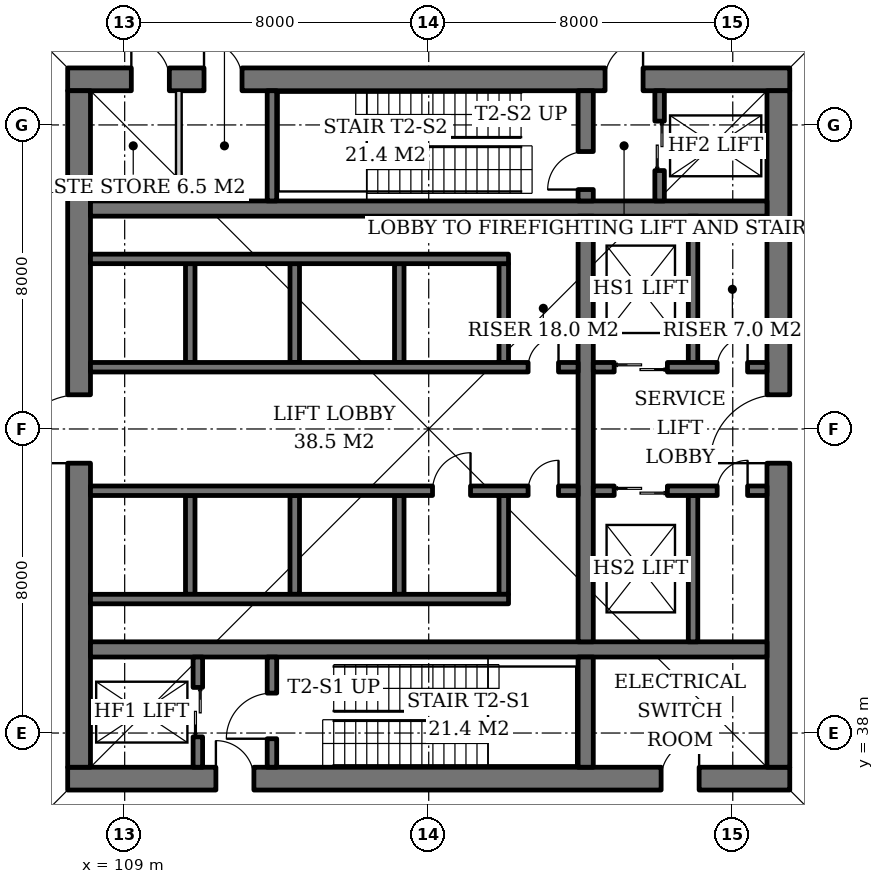
"""IFC4 building model, lengths in metres.
Left out: names, types, materials, properties, quantities, classifications, styles, units other than length and angle.
Written with IfcOpenShell. Run it as: python <this file> out.ifc"""

import sys

from ifc_helpers import new_model, si_unit, direction, frame, frame_2d, origin, place, context, subcontext, project, spatial, rectangle, extrude, element, fill, save


model = new_model("IFC4")
c1 = context("Model", 3, precision=1e-05, world=origin(), true_north=direction((0.0, 1.0)))
c2 = subcontext(c1, "Body", "Model", "MODEL_VIEW")
j1 = project(units=[si_unit("LENGTHUNIT", "METRE"), si_unit("PLANEANGLEUNIT", "RADIAN")], contexts=[c1])
p1 = place(None, origin())
s1 = spatial("IfcSite", under=j1, at=p1, CompositionType="ELEMENT")
p2 = place(p1, origin())
s2 = spatial("IfcBuilding", under=s1, at=p2, CompositionType="ELEMENT")
p3 = place(p2, frame((0.0, 0.0, -10.0)))
s3 = spatial("IfcBuildingStorey", under=s2, at=p3, CompositionType="ELEMENT", Elevation=-10.0)
p4 = place(p3, frame((107.5, 36.8, 0.0), z_axis=(0.0, 0.0, 1.0), x_axis=(1.0, 0.0, 0.0)))
e1 = element("IfcWall", 1, at=p4, inside=s3, PredefinedType="SHEAR", context=c2, shape_type="SweptSolid", body=[
    extrude(rectangle(XDim=19.0, YDim=0.6, at=frame_2d((9.5, 0.0))), origin(), (0.0, 0.0, 1.0), 5.0),
])
p5 = place(p4, frame((3.9, 0.0, 0.0)))
e2 = element("IfcOpeningElement", 2, at=p5, cuts=e1, PredefinedType="OPENING", context=c2, shape_type="SweptSolid", body=[
    extrude(rectangle(XDim=1.0, YDim=2.1, at=frame_2d((0.5, 1.05))), frame((0.0, 0.31, 0.0), z_axis=(0.0, -1.0, 0.0), x_axis=(1.0, 0.0, 0.0)), (0.0, 0.0, 1.0), 0.62),
])
p6 = place(p4, frame((15.615, 0.0, 0.0)))
e3 = element("IfcOpeningElement", 3, at=p6, cuts=e1, PredefinedType="OPENING", context=c2, shape_type="SweptSolid", body=[
    extrude(rectangle(XDim=1.0, YDim=2.1, at=frame_2d((0.5, 1.05))), frame((0.0, 0.31, 0.0), z_axis=(0.0, -1.0, 0.0), x_axis=(1.0, 0.0, 0.0)), (0.0, 0.0, 1.0), 0.62),
])
p7 = place(p3, frame((107.5, 55.2, 0.0), z_axis=(0.0, 0.0, 1.0), x_axis=(1.0, 0.0, 0.0)))
e4 = element("IfcWall", 4, at=p7, inside=s3, PredefinedType="SHEAR", context=c2, shape_type="SweptSolid", body=[
    extrude(rectangle(XDim=19.0, YDim=0.6, at=frame_2d((9.5, 0.0))), origin(), (0.0, 0.0, 1.0), 5.0),
])
p8 = place(p7, frame((14.14, 0.0, 0.0)))
e5 = element("IfcOpeningElement", 5, at=p8, cuts=e4, PredefinedType="OPENING", context=c2, shape_type="SweptSolid", body=[
    extrude(rectangle(XDim=1.0, YDim=2.1, at=frame_2d((0.5, 1.05))), frame((0.0, 0.31, 0.0), z_axis=(0.0, -1.0, 0.0), x_axis=(1.0, 0.0, 0.0)), (0.0, 0.0, 1.0), 0.62),
])
p9 = place(p7, frame((1.675, 0.0, 0.0)))
e6 = element("IfcOpeningElement", 6, at=p9, cuts=e4, PredefinedType="OPENING", context=c2, shape_type="SweptSolid", body=[
    extrude(rectangle(XDim=1.0, YDim=2.1, at=frame_2d((0.5, 1.05))), frame((0.0, 0.31, 0.0), z_axis=(0.0, -1.0, 0.0), x_axis=(1.0, 0.0, 0.0)), (0.0, 0.0, 1.0), 0.62),
])
p10 = place(p7, frame((3.587, 0.0, 0.0)))
e7 = element("IfcOpeningElement", 7, at=p10, cuts=e4, PredefinedType="OPENING", context=c2, shape_type="SweptSolid", body=[
    extrude(rectangle(XDim=1.0, YDim=2.1, at=frame_2d((0.5, 1.05))), frame((0.0, 0.31, 0.0), z_axis=(0.0, -1.0, 0.0), x_axis=(1.0, 0.0, 0.0)), (0.0, 0.0, 1.0), 0.62),
])
p11 = place(p3, frame((107.8, 37.1, 0.0), z_axis=(0.0, 0.0, 1.0), x_axis=(0.0, 1.0, 0.0)))
e8 = element("IfcWall", 8, at=p11, inside=s3, PredefinedType="SHEAR", context=c2, shape_type="SweptSolid", body=[
    extrude(rectangle(XDim=17.8, YDim=0.6, at=frame_2d((8.9, 0.0))), origin(), (0.0, 0.0, 1.0), 5.0),
])
p12 = place(p11, frame((8.0, 0.0, 0.0)))
e9 = element("IfcOpeningElement", 9, at=p12, cuts=e8, PredefinedType="OPENING", context=c2, shape_type="SweptSolid", body=[
    extrude(rectangle(XDim=1.8, YDim=2.4, at=frame_2d((0.9, 1.2))), frame((0.0, 0.31, 0.0), z_axis=(0.0, -1.0, 0.0), x_axis=(1.0, 0.0, 0.0)), (0.0, 0.0, 1.0), 0.62),
])
p13 = place(p3, frame((126.2, 37.1, 0.0), z_axis=(0.0, 0.0, 1.0), x_axis=(0.0, 1.0, 0.0)))
e10 = element("IfcWall", 10, at=p13, inside=s3, PredefinedType="SHEAR", context=c2, shape_type="SweptSolid", body=[
    extrude(rectangle(XDim=17.8, YDim=0.6, at=frame_2d((8.9, 0.0))), origin(), (0.0, 0.0, 1.0), 5.0),
])
p14 = place(p13, frame((8.0, 0.0, 0.0)))
e11 = element("IfcOpeningElement", 11, at=p14, cuts=e10, PredefinedType="OPENING", context=c2, shape_type="SweptSolid", body=[
    extrude(rectangle(XDim=1.8, YDim=2.4, at=frame_2d((0.9, 1.2))), frame((0.0, 0.31, 0.0), z_axis=(0.0, -1.0, 0.0), x_axis=(1.0, 0.0, 0.0)), (0.0, 0.0, 1.0), 0.62),
])
for number, where, z_axis, x_axis in (
    (12, (108.1, 40.2, 0.0), (0.0, 0.0, 1.0), (1.0, 0.0, 0.0)),
    (13, (108.1, 51.8, 0.0), (0.0, 0.0, 1.0), (1.0, 0.0, 0.0)),
):
    element("IfcWall", number, at=place(p3, frame(where, z_axis=z_axis, x_axis=x_axis)), inside=s3, PredefinedType="SHEAR", context=c2, shape_type="SweptSolid", body=[
        extrude(rectangle(XDim=17.8, YDim=0.4, at=frame_2d((8.9, 0.0))), origin(), (0.0, 0.0, 1.0), 5.0),
    ])
p15 = place(p3, frame((121.13, 37.1, 0.0), z_axis=(0.0, 0.0, 1.0), x_axis=(0.0, 1.0, 0.0)))
e14 = element("IfcWall", 14, at=p15, inside=s3, PredefinedType="SHEAR", context=c2, shape_type="SweptSolid", body=[
    extrude(rectangle(XDim=2.9, YDim=0.4, at=frame_2d((1.45, 0.0))), origin(), (0.0, 0.0, 1.0), 5.0),
])
p16 = place(p3, frame((121.13, 40.4, 0.0), z_axis=(0.0, 0.0, 1.0), x_axis=(0.0, 1.0, 0.0)))
e15 = element("IfcWall", 15, at=p16, inside=s3, PredefinedType="SHEAR", context=c2, shape_type="SweptSolid", body=[
    extrude(rectangle(XDim=11.2, YDim=0.4, at=frame_2d((5.6, 0.0))), origin(), (0.0, 0.0, 1.0), 5.0),
])
p17 = place(p3, frame((121.13, 52.0, 0.0), z_axis=(0.0, 0.0, 1.0), x_axis=(0.0, 1.0, 0.0)))
e16 = element("IfcWall", 16, at=p17, inside=s3, PredefinedType="SHEAR", context=c2, shape_type="SweptSolid", body=[
    extrude(rectangle(XDim=2.9, YDim=0.4, at=frame_2d((1.45, 0.0))), origin(), (0.0, 0.0, 1.0), 5.0),
])
p18 = place(p17, frame((0.3, 0.0, 0.0)))
e17 = element("IfcOpeningElement", 17, at=p18, cuts=e16, PredefinedType="OPENING", context=c2, shape_type="SweptSolid", body=[
    extrude(rectangle(XDim=1.0, YDim=2.1, at=frame_2d((0.5, 1.05))), frame((0.0, 0.21, 0.0), z_axis=(0.0, -1.0, 0.0), x_axis=(1.0, 0.0, 0.0)), (0.0, 0.0, 1.0), 0.42),
])
p19 = place(p3, frame((110.925, 37.1, 0.0), z_axis=(0.0, 0.0, 1.0), x_axis=(0.0, 1.0, 0.0)))
e18 = element("IfcWall", 18, at=p19, inside=s3, PredefinedType="SHEAR", context=c2, shape_type="SweptSolid", body=[
    extrude(rectangle(XDim=2.9, YDim=0.25, at=frame_2d((1.45, 0.0))), origin(), (0.0, 0.0, 1.0), 5.0),
])
p20 = place(p19, frame((0.8, 0.0, 0.0)))
e19 = element("IfcOpeningElement", 19, at=p20, cuts=e18, PredefinedType="OPENING", context=c2, shape_type="SweptSolid", body=[
    extrude(rectangle(XDim=1.3, YDim=2.2, at=frame_2d((0.65, 1.1))), frame((0.0, 0.135, 0.0), z_axis=(0.0, -1.0, 0.0), x_axis=(1.0, 0.0, 0.0)), (0.0, 0.0, 1.0), 0.27),
])
p21 = place(p3, frame((112.875, 37.1, 0.0), z_axis=(0.0, 0.0, 1.0), x_axis=(0.0, 1.0, 0.0)))
e20 = element("IfcWall", 20, at=p21, inside=s3, PredefinedType="SHEAR", context=c2, shape_type="SweptSolid", body=[
    extrude(rectangle(XDim=2.9, YDim=0.25, at=frame_2d((1.45, 0.0))), origin(), (0.0, 0.0, 1.0), 5.0),
])
p22 = place(p21, frame((0.75, 0.0, 0.0)))
e21 = element("IfcOpeningElement", 21, at=p22, cuts=e20, PredefinedType="OPENING", context=c2, shape_type="SweptSolid", body=[
    extrude(rectangle(XDim=1.2, YDim=2.1, at=frame_2d((0.6, 1.05))), frame((0.0, 0.135, 0.0), z_axis=(0.0, -1.0, 0.0), x_axis=(1.0, 0.0, 0.0)), (0.0, 0.0, 1.0), 0.27),
])
p23 = place(p3, frame((112.875, 52.0, 0.0), z_axis=(0.0, 0.0, 1.0), x_axis=(0.0, 1.0, 0.0)))
e22 = element("IfcWall", 22, at=p23, inside=s3, PredefinedType="SHEAR", context=c2, shape_type="SweptSolid", body=[
    extrude(rectangle(XDim=2.9, YDim=0.25, at=frame_2d((1.45, 0.0))), origin(), (0.0, 0.0, 1.0), 5.0),
])
p24 = place(p3, frame((123.075, 52.0, 0.0), z_axis=(0.0, 0.0, 1.0), x_axis=(0.0, 1.0, 0.0)))
e23 = element("IfcWall", 23, at=p24, inside=s3, PredefinedType="SHEAR", context=c2, shape_type="SweptSolid", body=[
    extrude(rectangle(XDim=2.9, YDim=0.25, at=frame_2d((1.45, 0.0))), origin(), (0.0, 0.0, 1.0), 5.0),
])
p25 = place(p24, frame((0.8, 0.0, 0.0)))
e24 = element("IfcOpeningElement", 24, at=p25, cuts=e23, PredefinedType="OPENING", context=c2, shape_type="SweptSolid", body=[
    extrude(rectangle(XDim=1.3, YDim=2.2, at=frame_2d((0.65, 1.1))), frame((0.0, 0.135, 0.0), z_axis=(0.0, -1.0, 0.0), x_axis=(1.0, 0.0, 0.0)), (0.0, 0.0, 1.0), 0.27),
])
for number, where, z_axis, x_axis in (
    (25, (110.725, 47.75, 0.0), (0.0, 0.0, 1.0), (0.0, 1.0, 0.0)),
    (26, (113.475, 47.75, 0.0), (0.0, 0.0, 1.0), (0.0, 1.0, 0.0)),
    (27, (116.225, 47.75, 0.0), (0.0, 0.0, 1.0), (0.0, 1.0, 0.0)),
    (28, (118.975, 47.75, 0.0), (0.0, 0.0, 1.0), (0.0, 1.0, 0.0)),
):
    element("IfcWall", number, at=place(p3, frame(where, z_axis=z_axis, x_axis=x_axis)), inside=s3, PredefinedType="SHEAR", context=c2, shape_type="SweptSolid", body=[
        extrude(rectangle(XDim=2.6, YDim=0.25, at=frame_2d((1.3, 0.0))), origin(), (0.0, 0.0, 1.0), 5.0),
    ])
p26 = place(p3, frame((108.1, 50.475, 0.0), z_axis=(0.0, 0.0, 1.0), x_axis=(1.0, 0.0, 0.0)))
e29 = element("IfcWall", 29, at=p26, inside=s3, PredefinedType="SHEAR", context=c2, shape_type="SweptSolid", body=[
    extrude(rectangle(XDim=11.0, YDim=0.25, at=frame_2d((5.5, 0.0))), origin(), (0.0, 0.0, 1.0), 5.0),
])
p27 = place(p3, frame((108.1, 47.625, 0.0), z_axis=(0.0, 0.0, 1.0), x_axis=(1.0, 0.0, 0.0)))
e30 = element("IfcWall", 30, at=p27, inside=s3, PredefinedType="SHEAR", context=c2, shape_type="SweptSolid", body=[
    extrude(rectangle(XDim=12.83, YDim=0.25, at=frame_2d((6.415, 0.0))), origin(), (0.0, 0.0, 1.0), 5.0),
])
p28 = place(p27, frame((11.515, 0.0, 0.0)))
e31 = element("IfcOpeningElement", 31, at=p28, cuts=e30, PredefinedType="OPENING", context=c2, shape_type="SweptSolid", body=[
    extrude(rectangle(XDim=0.8, YDim=2.0, at=frame_2d((0.4, 1.0))), frame((0.0, 0.135, 0.0), z_axis=(0.0, -1.0, 0.0), x_axis=(1.0, 0.0, 0.0)), (0.0, 0.0, 1.0), 0.27),
])
for number, where, z_axis, x_axis in (
    (32, (110.725, 44.25, 0.0), (0.0, 0.0, 1.0), (0.0, -1.0, 0.0)),
    (33, (113.475, 44.25, 0.0), (0.0, 0.0, 1.0), (0.0, -1.0, 0.0)),
    (34, (116.225, 44.25, 0.0), (0.0, 0.0, 1.0), (0.0, -1.0, 0.0)),
    (35, (118.975, 44.25, 0.0), (0.0, 0.0, 1.0), (0.0, -1.0, 0.0)),
):
    element("IfcWall", number, at=place(p3, frame(where, z_axis=z_axis, x_axis=x_axis)), inside=s3, PredefinedType="SHEAR", context=c2, shape_type="SweptSolid", body=[
        extrude(rectangle(XDim=2.6, YDim=0.25, at=frame_2d((1.3, 0.0))), origin(), (0.0, 0.0, 1.0), 5.0),
    ])
p29 = place(p3, frame((108.1, 41.525, 0.0), z_axis=(0.0, 0.0, 1.0), x_axis=(1.0, 0.0, 0.0)))
e36 = element("IfcWall", 36, at=p29, inside=s3, PredefinedType="SHEAR", context=c2, shape_type="SweptSolid", body=[
    extrude(rectangle(XDim=11.0, YDim=0.25, at=frame_2d((5.5, 0.0))), origin(), (0.0, 0.0, 1.0), 5.0),
])
p30 = place(p3, frame((108.1, 44.375, 0.0), z_axis=(0.0, 0.0, 1.0), x_axis=(1.0, 0.0, 0.0)))
e37 = element("IfcWall", 37, at=p30, inside=s3, PredefinedType="SHEAR", context=c2, shape_type="SweptSolid", body=[
    extrude(rectangle(XDim=12.83, YDim=0.25, at=frame_2d((6.415, 0.0))), origin(), (0.0, 0.0, 1.0), 5.0),
])
p31 = place(p30, frame((9.0, 0.0, 0.0)))
e38 = element("IfcOpeningElement", 38, at=p31, cuts=e37, PredefinedType="OPENING", context=c2, shape_type="SweptSolid", body=[
    extrude(rectangle(XDim=1.0, YDim=2.1, at=frame_2d((0.5, 1.05))), frame((0.0, 0.135, 0.0), z_axis=(0.0, -1.0, 0.0), x_axis=(1.0, 0.0, 0.0)), (0.0, 0.0, 1.0), 0.27),
])
p32 = place(p30, frame((11.515, 0.0, 0.0)))
e39 = element("IfcOpeningElement", 39, at=p32, cuts=e37, PredefinedType="OPENING", context=c2, shape_type="SweptSolid", body=[
    extrude(rectangle(XDim=0.8, YDim=2.0, at=frame_2d((0.4, 1.0))), frame((0.0, 0.135, 0.0), z_axis=(0.0, -1.0, 0.0), x_axis=(1.0, 0.0, 0.0)), (0.0, 0.0, 1.0), 0.27),
])
p33 = place(p3, frame((123.955, 47.75, 0.0), z_axis=(0.0, 0.0, 1.0), x_axis=(0.0, 1.0, 0.0)))
e40 = element("IfcWall", 40, at=p33, inside=s3, PredefinedType="SHEAR", context=c2, shape_type="SweptSolid", body=[
    extrude(rectangle(XDim=3.85, YDim=0.25, at=frame_2d((1.925, 0.0))), origin(), (0.0, 0.0, 1.0), 5.0),
])
p34 = place(p3, frame((121.33, 47.625, 0.0), z_axis=(0.0, 0.0, 1.0), x_axis=(1.0, 0.0, 0.0)))
e41 = element("IfcWall", 41, at=p34, inside=s3, PredefinedType="SHEAR", context=c2, shape_type="SweptSolid", body=[
    extrude(rectangle(XDim=4.57, YDim=0.25, at=frame_2d((2.285, 0.0))), origin(), (0.0, 0.0, 1.0), 5.0),
])
p35 = place(p34, frame((0.55, 0.0, 0.0)))
e42 = element("IfcOpeningElement", 42, at=p35, cuts=e41, PredefinedType="OPENING", context=c2, shape_type="SweptSolid", body=[
    extrude(rectangle(XDim=1.4, YDim=2.4, at=frame_2d((0.7, 1.2))), frame((0.0, 0.135, 0.0), z_axis=(0.0, -1.0, 0.0), x_axis=(1.0, 0.0, 0.0)), (0.0, 0.0, 1.0), 0.27),
])
p36 = place(p34, frame((3.26, 0.0, 0.0)))
e43 = element("IfcOpeningElement", 43, at=p36, cuts=e41, PredefinedType="OPENING", context=c2, shape_type="SweptSolid", body=[
    extrude(rectangle(XDim=0.8, YDim=2.0, at=frame_2d((0.4, 1.0))), frame((0.0, 0.135, 0.0), z_axis=(0.0, -1.0, 0.0), x_axis=(1.0, 0.0, 0.0)), (0.0, 0.0, 1.0), 0.27),
])
p37 = place(p3, frame((123.955, 44.25, 0.0), z_axis=(0.0, 0.0, 1.0), x_axis=(0.0, -1.0, 0.0)))
e44 = element("IfcWall", 44, at=p37, inside=s3, PredefinedType="SHEAR", context=c2, shape_type="SweptSolid", body=[
    extrude(rectangle(XDim=3.85, YDim=0.25, at=frame_2d((1.925, 0.0))), origin(), (0.0, 0.0, 1.0), 5.0),
])
p38 = place(p3, frame((121.33, 44.375, 0.0), z_axis=(0.0, 0.0, 1.0), x_axis=(1.0, 0.0, 0.0)))
e45 = element("IfcWall", 45, at=p38, inside=s3, PredefinedType="SHEAR", context=c2, shape_type="SweptSolid", body=[
    extrude(rectangle(XDim=4.57, YDim=0.25, at=frame_2d((2.285, 0.0))), origin(), (0.0, 0.0, 1.0), 5.0),
])
p39 = place(p38, frame((0.55, 0.0, 0.0)))
e46 = element("IfcOpeningElement", 46, at=p39, cuts=e45, PredefinedType="OPENING", context=c2, shape_type="SweptSolid", body=[
    extrude(rectangle(XDim=1.4, YDim=2.4, at=frame_2d((0.7, 1.2))), frame((0.0, 0.135, 0.0), z_axis=(0.0, -1.0, 0.0), x_axis=(1.0, 0.0, 0.0)), (0.0, 0.0, 1.0), 0.27),
])
p40 = place(p38, frame((3.26, 0.0, 0.0)))
e47 = element("IfcOpeningElement", 47, at=p40, cuts=e45, PredefinedType="OPENING", context=c2, shape_type="SweptSolid", body=[
    extrude(rectangle(XDim=0.8, YDim=2.0, at=frame_2d((0.4, 1.0))), frame((0.0, 0.135, 0.0), z_axis=(0.0, -1.0, 0.0), x_axis=(1.0, 0.0, 0.0)), (0.0, 0.0, 1.0), 0.27),
])
p41 = place(p3, frame((110.425, 52.0, 0.0), z_axis=(0.0, 0.0, 1.0), x_axis=(0.0, 1.0, 0.0)))
e48 = element("IfcWall", 48, at=p41, inside=s3, PredefinedType="SOLIDWALL", context=c2, shape_type="SweptSolid", body=[
    extrude(rectangle(XDim=2.9, YDim=0.15, at=frame_2d((1.45, 0.0))), origin(), (0.0, 0.0, 1.0), 4.7),
])
p42 = place(p20, origin())
e49 = element("IfcDoor", 49, at=p42, inside=s3, OperationType="DOUBLE_DOOR_SLIDING", PredefinedType="DOOR", context=c2, shape_type="SweptSolid", body=[
    extrude(rectangle(XDim=1.3, YDim=2.2, at=frame_2d((0.65, 1.1))), frame((0.0, 0.025, 0.0), z_axis=(0.0, -1.0, 0.0), x_axis=(1.0, 0.0, 0.0)), (0.0, 0.0, 1.0), 0.05),
])
fill(e19, e49)
p43 = place(p22, origin())
e50 = element("IfcDoor", 50, at=p43, inside=s3, OperationType="SINGLE_SWING_LEFT", PredefinedType="DOOR", context=c2, shape_type="SweptSolid", body=[
    extrude(rectangle(XDim=1.2, YDim=2.1, at=frame_2d((0.6, 1.05))), frame((0.0, 0.025, 0.0), z_axis=(0.0, -1.0, 0.0), x_axis=(1.0, 0.0, 0.0)), (0.0, 0.0, 1.0), 0.05),
])
fill(e21, e50)
p44 = place(p25, origin())
e51 = element("IfcDoor", 51, at=p44, inside=s3, OperationType="DOUBLE_DOOR_SLIDING", PredefinedType="DOOR", context=c2, shape_type="SweptSolid", body=[
    extrude(rectangle(XDim=1.3, YDim=2.2, at=frame_2d((0.65, 1.1))), frame((0.0, 0.025, 0.0), z_axis=(0.0, -1.0, 0.0), x_axis=(1.0, 0.0, 0.0)), (0.0, 0.0, 1.0), 0.05),
])
fill(e24, e51)
p45 = place(p28, origin())
e52 = element("IfcDoor", 52, at=p45, inside=s3, OperationType="SINGLE_SWING_RIGHT", PredefinedType="DOOR", context=c2, shape_type="SweptSolid", body=[
    extrude(rectangle(XDim=0.8, YDim=2.0, at=frame_2d((0.4, 1.0))), frame((0.0, 0.025, 0.0), z_axis=(0.0, -1.0, 0.0), x_axis=(1.0, 0.0, 0.0)), (0.0, 0.0, 1.0), 0.05),
])
fill(e31, e52)
p46 = place(p31, origin())
e53 = element("IfcDoor", 53, at=p46, inside=s3, OperationType="SINGLE_SWING_RIGHT", PredefinedType="DOOR", context=c2, shape_type="SweptSolid", body=[
    extrude(rectangle(XDim=1.0, YDim=2.1, at=frame_2d((0.5, 1.05))), frame((0.0, 0.025, 0.0), z_axis=(0.0, -1.0, 0.0), x_axis=(1.0, 0.0, 0.0)), (0.0, 0.0, 1.0), 0.05),
])
fill(e38, e53)
p47 = place(p32, origin())
e54 = element("IfcDoor", 54, at=p47, inside=s3, OperationType="SINGLE_SWING_RIGHT", PredefinedType="DOOR", context=c2, shape_type="SweptSolid", body=[
    extrude(rectangle(XDim=0.8, YDim=2.0, at=frame_2d((0.4, 1.0))), frame((0.0, 0.025, 0.0), z_axis=(0.0, -1.0, 0.0), x_axis=(1.0, 0.0, 0.0)), (0.0, 0.0, 1.0), 0.05),
])
fill(e39, e54)
p48 = place(p35, origin())
e55 = element("IfcDoor", 55, at=p48, inside=s3, OperationType="DOUBLE_DOOR_SLIDING", PredefinedType="DOOR", context=c2, shape_type="SweptSolid", body=[
    extrude(rectangle(XDim=1.4, YDim=2.4, at=frame_2d((0.7, 1.2))), frame((0.0, 0.025, 0.0), z_axis=(0.0, -1.0, 0.0), x_axis=(1.0, 0.0, 0.0)), (0.0, 0.0, 1.0), 0.05),
])
fill(e42, e55)
p49 = place(p36, origin())
e56 = element("IfcDoor", 56, at=p49, inside=s3, OperationType="SINGLE_SWING_RIGHT", PredefinedType="DOOR", context=c2, shape_type="SweptSolid", body=[
    extrude(rectangle(XDim=0.8, YDim=2.0, at=frame_2d((0.4, 1.0))), frame((0.0, 0.025, 0.0), z_axis=(0.0, -1.0, 0.0), x_axis=(1.0, 0.0, 0.0)), (0.0, 0.0, 1.0), 0.05),
])
fill(e43, e56)
p50 = place(p39, origin())
e57 = element("IfcDoor", 57, at=p50, inside=s3, OperationType="DOUBLE_DOOR_SLIDING", PredefinedType="DOOR", context=c2, shape_type="SweptSolid", body=[
    extrude(rectangle(XDim=1.4, YDim=2.4, at=frame_2d((0.7, 1.2))), frame((0.0, 0.025, 0.0), z_axis=(0.0, -1.0, 0.0), x_axis=(1.0, 0.0, 0.0)), (0.0, 0.0, 1.0), 0.05),
])
fill(e46, e57)
p51 = place(p40, origin())
e58 = element("IfcDoor", 58, at=p51, inside=s3, OperationType="SINGLE_SWING_RIGHT", PredefinedType="DOOR", context=c2, shape_type="SweptSolid", body=[
    extrude(rectangle(XDim=0.8, YDim=2.0, at=frame_2d((0.4, 1.0))), frame((0.0, 0.025, 0.0), z_axis=(0.0, -1.0, 0.0), x_axis=(1.0, 0.0, 0.0)), (0.0, 0.0, 1.0), 0.05),
])
fill(e47, e58)
p52 = place(p18, origin())
e59 = element("IfcDoor", 59, at=p52, inside=s3, OperationType="SINGLE_SWING_LEFT", PredefinedType="DOOR", context=c2, shape_type="SweptSolid", body=[
    extrude(rectangle(XDim=1.0, YDim=2.1, at=frame_2d((0.5, 1.05))), frame((0.0, 0.025, 0.0), z_axis=(0.0, -1.0, 0.0), x_axis=(1.0, 0.0, 0.0)), (0.0, 0.0, 1.0), 0.05),
])
fill(e17, e59)
p53 = place(p5, origin())
e60 = element("IfcDoor", 60, at=p53, inside=s3, OperationType="SINGLE_SWING_LEFT", PredefinedType="DOOR", context=c2, shape_type="SweptSolid", body=[
    extrude(rectangle(XDim=1.0, YDim=2.1, at=frame_2d((0.5, 1.05))), frame((0.0, 0.025, 0.0), z_axis=(0.0, -1.0, 0.0), x_axis=(1.0, 0.0, 0.0)), (0.0, 0.0, 1.0), 0.05),
])
fill(e2, e60)
p54 = place(p8, origin())
e61 = element("IfcDoor", 61, at=p54, inside=s3, OperationType="SINGLE_SWING_RIGHT", PredefinedType="DOOR", context=c2, shape_type="SweptSolid", body=[
    extrude(rectangle(XDim=1.0, YDim=2.1, at=frame_2d((0.5, 1.05))), frame((0.0, 0.025, 0.0), z_axis=(0.0, -1.0, 0.0), x_axis=(1.0, 0.0, 0.0)), (0.0, 0.0, 1.0), 0.05),
])
fill(e5, e61)
p55 = place(p12, origin())
e62 = element("IfcDoor", 62, at=p55, inside=s3, OperationType="DOUBLE_DOOR_SINGLE_SWING", PredefinedType="DOOR", context=c2, shape_type="SweptSolid", body=[
    extrude(rectangle(XDim=1.8, YDim=2.4, at=frame_2d((0.9, 1.2))), frame((0.0, 0.025, 0.0), z_axis=(0.0, -1.0, 0.0), x_axis=(1.0, 0.0, 0.0)), (0.0, 0.0, 1.0), 0.05),
])
fill(e9, e62)
p56 = place(p14, origin())
e63 = element("IfcDoor", 63, at=p56, inside=s3, OperationType="DOUBLE_DOOR_SINGLE_SWING", PredefinedType="DOOR", context=c2, shape_type="SweptSolid", body=[
    extrude(rectangle(XDim=1.8, YDim=2.4, at=frame_2d((0.9, 1.2))), frame((0.0, 0.025, 0.0), z_axis=(0.0, -1.0, 0.0), x_axis=(1.0, 0.0, 0.0)), (0.0, 0.0, 1.0), 0.05),
])
fill(e11, e63)
p57 = place(p6, origin())
e64 = element("IfcDoor", 64, at=p57, inside=s3, OperationType="SINGLE_SWING_RIGHT", PredefinedType="DOOR", context=c2, shape_type="SweptSolid", body=[
    extrude(rectangle(XDim=1.0, YDim=2.1, at=frame_2d((0.5, 1.05))), frame((0.0, 0.29, 0.0), z_axis=(0.0, -1.0, 0.0), x_axis=(1.0, 0.0, 0.0)), (0.0, 0.0, 1.0), 0.05),
])
fill(e3, e64)
p58 = place(p9, origin())
e65 = element("IfcDoor", 65, at=p58, inside=s3, OperationType="SINGLE_SWING_LEFT", PredefinedType="DOOR", context=c2, shape_type="SweptSolid", body=[
    extrude(rectangle(XDim=1.0, YDim=2.1, at=frame_2d((0.5, 1.05))), frame((0.0, -0.24, 0.0), z_axis=(0.0, -1.0, 0.0), x_axis=(1.0, 0.0, 0.0)), (0.0, 0.0, 1.0), 0.05),
])
fill(e6, e65)
p59 = place(p10, origin())
e66 = element("IfcDoor", 66, at=p59, inside=s3, OperationType="SINGLE_SWING_LEFT", PredefinedType="DOOR", context=c2, shape_type="SweptSolid", body=[
    extrude(rectangle(XDim=1.0, YDim=2.1, at=frame_2d((0.5, 1.05))), frame((0.0, -0.24, 0.0), z_axis=(0.0, -1.0, 0.0), x_axis=(1.0, 0.0, 0.0)), (0.0, 0.0, 1.0), 0.05),
])
fill(e7, e66)
save(model, sys.argv[1])
